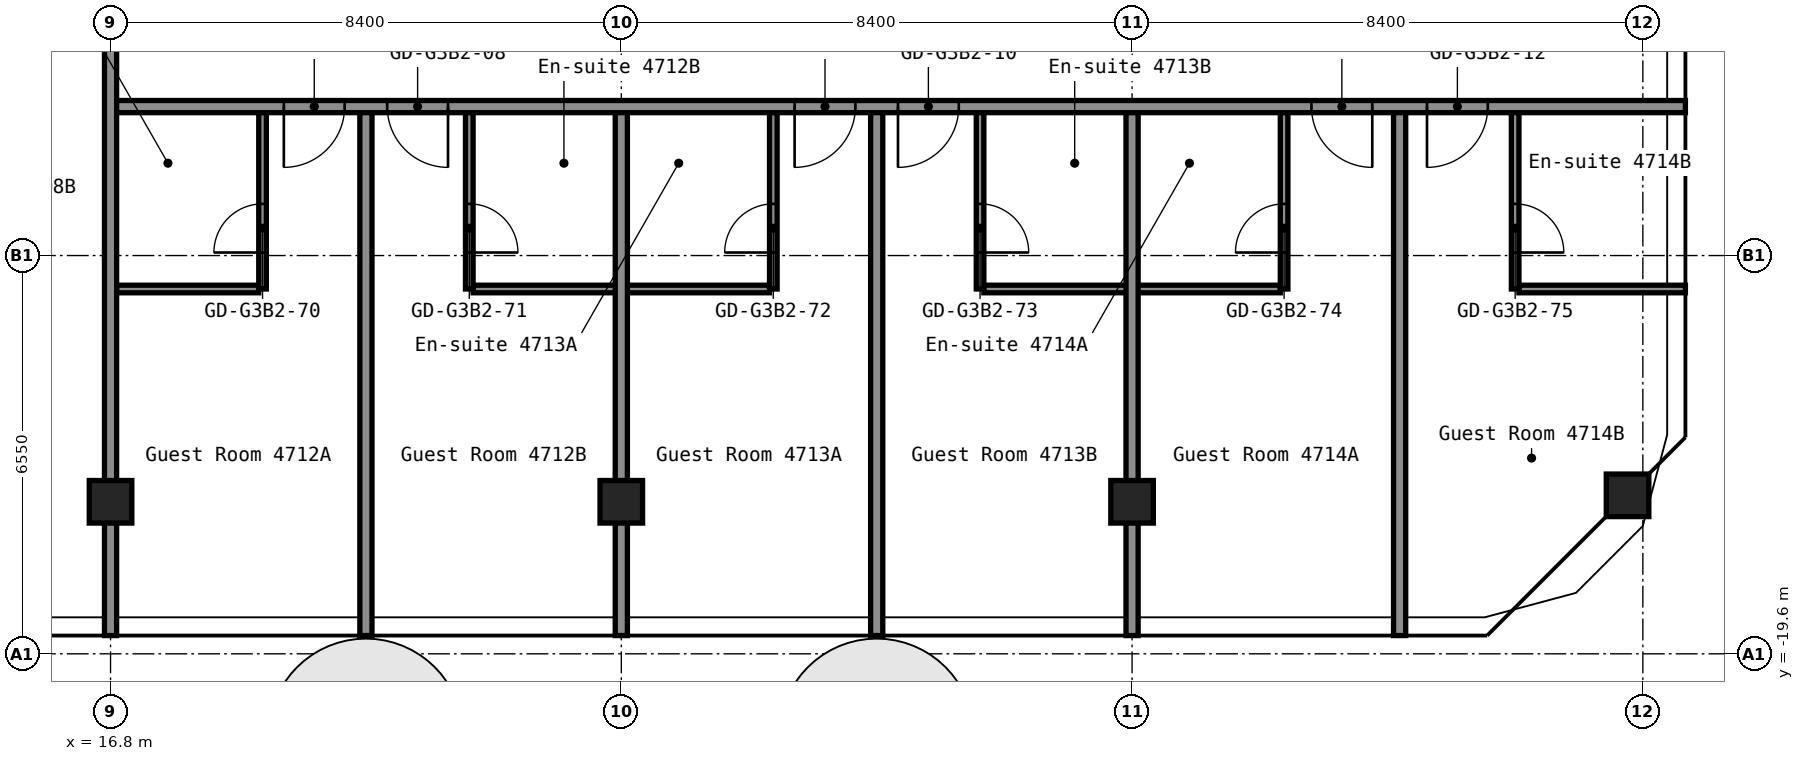
"""IFC4 building model, lengths in metres.
Left out: names, types, materials, properties, quantities, classifications, styles, units other than length and angle.
Written with IfcOpenShell. Run it as: python <this file> out.ifc"""

import sys

from ifc_helpers import new_model, si_unit, direction, frame, frame_2d, origin, origin_2d, place, context, subcontext, project, spatial, rectangle, hollow_rectangle, extrude, element, fill, save


model = new_model("IFC4")
c1 = context("Model", 3, precision=1e-05, world=origin(), true_north=direction((0.0, 1.0)))
c2 = subcontext(c1, "Body", "Model", "MODEL_VIEW")
j1 = project(units=[si_unit("LENGTHUNIT", "METRE"), si_unit("PLANEANGLEUNIT", "RADIAN")], contexts=[c1])
p1 = place(None, origin())
s1 = spatial("IfcSite", under=j1, at=p1, CompositionType="ELEMENT")
p2 = place(p1, origin())
s2 = spatial("IfcBuilding", under=s1, at=p2, CompositionType="ELEMENT")
p3 = place(p2, frame((0.0, 0.0, 166.2)))
s3 = spatial("IfcBuildingStorey", under=s2, at=p3, CompositionType="ELEMENT", Elevation=166.2)
for number, where, z_axis, x_axis in (
    (1, (16.8, -17.1, 0.0), (0.0, 0.0, 1.0), (1.0, 0.0, 0.0)),
    (2, (25.2, -17.1, 0.0), (0.0, 0.0, 1.0), (1.0, 0.0, 0.0)),
    (3, (33.6, -17.1, 0.0), (0.0, 0.0, 1.0), (1.0, 0.0, 0.0)),
    (4, (41.749, -16.994, 0.0), (0.0, 0.0, 1.0), (1.0, 0.0, 0.0)),
):
    element("IfcColumn", number, at=place(p3, frame(where, z_axis=z_axis, x_axis=x_axis)), inside=s3, PredefinedType="COLUMN", context=c2, shape_type="SweptSolid", body=[
        extrude(hollow_rectangle(XDim=0.7, YDim=0.7, WallThickness=0.028, at=origin_2d()), origin(), (0.0, 0.0, 1.0), 2.75),
    ])
p4 = place(p3, frame((16.9, -13.6, 0.0), z_axis=(0.0, 0.0, 1.0), x_axis=(1.0, 0.0, 0.0)))
e5 = element("IfcWall", 5, at=p4, inside=s3, PredefinedType="PARTITIONING", context=c2, shape_type="SweptSolid", body=[
    extrude(rectangle(XDim=2.338, YDim=0.125, at=frame_2d((1.169, 0.0))), origin(), (0.0, 0.0, 1.0), 2.75),
])
for number, where, z_axis, x_axis in (
    (6, (22.762, -13.6, 0.0), (0.0, 0.0, 1.0), (1.0, 0.0, 0.0)),
    (7, (31.163, -13.6, 0.0), (0.0, 0.0, 1.0), (1.0, 0.0, 0.0)),
):
    element("IfcWall", number, at=place(p3, frame(where, z_axis=z_axis, x_axis=x_axis)), inside=s3, PredefinedType="PARTITIONING", context=c2, shape_type="SweptSolid", body=[
        extrude(rectangle(XDim=4.875, YDim=0.125, at=frame_2d((2.438, 0.0))), origin(), (0.0, 0.0, 1.0), 2.75),
    ])
p5 = place(p3, frame((39.962, -13.6, 0.0), z_axis=(0.0, 0.0, 1.0), x_axis=(1.0, 0.0, 0.0)))
e8 = element("IfcWall", 8, at=p5, inside=s3, PredefinedType="PARTITIONING", context=c2, shape_type="SweptSolid", body=[
    extrude(rectangle(XDim=2.738, YDim=0.125, at=frame_2d((1.369, 0.0))), origin(), (0.0, 0.0, 1.0), 2.75),
])
p6 = place(p3, frame((16.8, -10.6, 0.0), z_axis=(0.0, 0.0, 1.0), x_axis=(1.0, 0.0, 0.0)))
e9 = element("IfcWall", 9, at=p6, inside=s3, PredefinedType="PARTITIONING", context=c2, shape_type="SweptSolid", body=[
    extrude(rectangle(XDim=25.9, YDim=0.2, at=frame_2d((12.95, 0.0))), origin(), (0.0, 0.0, 1.0), 2.75),
])
p7 = place(p6, frame((2.85, 0.0, 0.0)))
e10 = element("IfcOpeningElement", 10, at=p7, cuts=e9, PredefinedType="OPENING", context=c2, shape_type="SweptSolid", body=[
    extrude(rectangle(XDim=1.0, YDim=2.1, at=frame_2d((0.5, 1.05))), frame((0.0, 0.11, 0.0), z_axis=(0.0, -1.0, 0.0), x_axis=(1.0, 0.0, 0.0)), (0.0, 0.0, 1.0), 0.22),
])
p8 = place(p6, frame((4.55, 0.0, 0.0)))
e11 = element("IfcOpeningElement", 11, at=p8, cuts=e9, PredefinedType="OPENING", context=c2, shape_type="SweptSolid", body=[
    extrude(rectangle(XDim=1.0, YDim=2.1, at=frame_2d((0.5, 1.05))), frame((0.0, 0.11, 0.0), z_axis=(0.0, -1.0, 0.0), x_axis=(1.0, 0.0, 0.0)), (0.0, 0.0, 1.0), 0.22),
])
p9 = place(p6, frame((11.25, 0.0, 0.0)))
e12 = element("IfcOpeningElement", 12, at=p9, cuts=e9, PredefinedType="OPENING", context=c2, shape_type="SweptSolid", body=[
    extrude(rectangle(XDim=1.0, YDim=2.1, at=frame_2d((0.5, 1.05))), frame((0.0, 0.11, 0.0), z_axis=(0.0, -1.0, 0.0), x_axis=(1.0, 0.0, 0.0)), (0.0, 0.0, 1.0), 0.22),
])
p10 = place(p6, frame((12.95, 0.0, 0.0)))
e13 = element("IfcOpeningElement", 13, at=p10, cuts=e9, PredefinedType="OPENING", context=c2, shape_type="SweptSolid", body=[
    extrude(rectangle(XDim=1.0, YDim=2.1, at=frame_2d((0.5, 1.05))), frame((0.0, 0.11, 0.0), z_axis=(0.0, -1.0, 0.0), x_axis=(1.0, 0.0, 0.0)), (0.0, 0.0, 1.0), 0.22),
])
p11 = place(p6, frame((19.75, 0.0, 0.0)))
e14 = element("IfcOpeningElement", 14, at=p11, cuts=e9, PredefinedType="OPENING", context=c2, shape_type="SweptSolid", body=[
    extrude(rectangle(XDim=1.0, YDim=2.1, at=frame_2d((0.5, 1.05))), frame((0.0, 0.11, 0.0), z_axis=(0.0, -1.0, 0.0), x_axis=(1.0, 0.0, 0.0)), (0.0, 0.0, 1.0), 0.22),
])
p12 = place(p6, frame((21.65, 0.0, 0.0)))
e15 = element("IfcOpeningElement", 15, at=p12, cuts=e9, PredefinedType="OPENING", context=c2, shape_type="SweptSolid", body=[
    extrude(rectangle(XDim=1.0, YDim=2.1, at=frame_2d((0.5, 1.05))), frame((0.0, 0.11, 0.0), z_axis=(0.0, -1.0, 0.0), x_axis=(1.0, 0.0, 0.0)), (0.0, 0.0, 1.0), 0.22),
])
p13 = place(p3, frame((16.8, -19.3, 0.0), z_axis=(0.0, 0.0, 1.0), x_axis=(0.0, 1.0, 0.0)))
e16 = element("IfcWall", 16, at=p13, inside=s3, PredefinedType="PARTITIONING", context=c2, shape_type="SweptSolid", body=[
    extrude(rectangle(XDim=10.91, YDim=0.2, at=frame_2d((5.455, 0.0))), origin(), (0.0, 0.0, 1.0), 2.75),
])
p14 = place(p3, frame((19.3, -13.6, 0.0), z_axis=(0.0, 0.0, 1.0), x_axis=(0.0, 1.0, 0.0)))
e17 = element("IfcWall", 17, at=p14, inside=s3, PredefinedType="PARTITIONING", context=c2, shape_type="SweptSolid", body=[
    extrude(rectangle(XDim=2.9, YDim=0.125, at=frame_2d((1.45, 0.0))), origin(), (0.0, 0.0, 1.0), 2.75),
])
p15 = place(p14, frame((0.6, 0.0, 0.0)))
e18 = element("IfcOpeningElement", 18, at=p15, cuts=e17, PredefinedType="OPENING", context=c2, shape_type="SweptSolid", body=[
    extrude(rectangle(XDim=0.8, YDim=2.1, at=frame_2d((0.4, 1.05))), frame((0.0, 0.073, 0.0), z_axis=(0.0, -1.0, 0.0), x_axis=(1.0, 0.0, 0.0)), (0.0, 0.0, 1.0), 0.145),
])
p16 = place(p3, frame((21.0, -19.3, 0.0), z_axis=(0.0, 0.0, 1.0), x_axis=(0.0, 1.0, 0.0)))
e19 = element("IfcWall", 19, at=p16, inside=s3, PredefinedType="PARTITIONING", context=c2, shape_type="SweptSolid", body=[
    extrude(rectangle(XDim=8.6, YDim=0.2, at=frame_2d((4.3, 0.0))), origin(), (0.0, 0.0, 1.0), 2.75),
])
p17 = place(p3, frame((22.7, -13.6, 0.0), z_axis=(0.0, 0.0, 1.0), x_axis=(0.0, 1.0, 0.0)))
e20 = element("IfcWall", 20, at=p17, inside=s3, PredefinedType="PARTITIONING", context=c2, shape_type="SweptSolid", body=[
    extrude(rectangle(XDim=2.9, YDim=0.125, at=frame_2d((1.45, 0.0))), origin(), (0.0, 0.0, 1.0), 2.75),
])
p18 = place(p17, frame((0.6, 0.0, 0.0)))
e21 = element("IfcOpeningElement", 21, at=p18, cuts=e20, PredefinedType="OPENING", context=c2, shape_type="SweptSolid", body=[
    extrude(rectangle(XDim=0.8, YDim=2.1, at=frame_2d((0.4, 1.05))), frame((0.0, 0.073, 0.0), z_axis=(0.0, -1.0, 0.0), x_axis=(1.0, 0.0, 0.0)), (0.0, 0.0, 1.0), 0.145),
])
p19 = place(p3, frame((25.2, -19.3, 0.0), z_axis=(0.0, 0.0, 1.0), x_axis=(0.0, 1.0, 0.0)))
e22 = element("IfcWall", 22, at=p19, inside=s3, PredefinedType="PARTITIONING", context=c2, shape_type="SweptSolid", body=[
    extrude(rectangle(XDim=8.6, YDim=0.2, at=frame_2d((4.3, 0.0))), origin(), (0.0, 0.0, 1.0), 2.75),
])
p20 = place(p3, frame((27.7, -13.6, 0.0), z_axis=(0.0, 0.0, 1.0), x_axis=(0.0, 1.0, 0.0)))
e23 = element("IfcWall", 23, at=p20, inside=s3, PredefinedType="PARTITIONING", context=c2, shape_type="SweptSolid", body=[
    extrude(rectangle(XDim=2.9, YDim=0.125, at=frame_2d((1.45, 0.0))), origin(), (0.0, 0.0, 1.0), 2.75),
])
p21 = place(p20, frame((0.6, 0.0, 0.0)))
e24 = element("IfcOpeningElement", 24, at=p21, cuts=e23, PredefinedType="OPENING", context=c2, shape_type="SweptSolid", body=[
    extrude(rectangle(XDim=0.8, YDim=2.1, at=frame_2d((0.4, 1.05))), frame((0.0, 0.073, 0.0), z_axis=(0.0, -1.0, 0.0), x_axis=(1.0, 0.0, 0.0)), (0.0, 0.0, 1.0), 0.145),
])
p22 = place(p3, frame((29.4, -19.3, 0.0), z_axis=(0.0, 0.0, 1.0), x_axis=(0.0, 1.0, 0.0)))
e25 = element("IfcWall", 25, at=p22, inside=s3, PredefinedType="PARTITIONING", context=c2, shape_type="SweptSolid", body=[
    extrude(rectangle(XDim=8.6, YDim=0.2, at=frame_2d((4.3, 0.0))), origin(), (0.0, 0.0, 1.0), 2.75),
])
p23 = place(p3, frame((31.1, -13.6, 0.0), z_axis=(0.0, 0.0, 1.0), x_axis=(0.0, 1.0, 0.0)))
e26 = element("IfcWall", 26, at=p23, inside=s3, PredefinedType="PARTITIONING", context=c2, shape_type="SweptSolid", body=[
    extrude(rectangle(XDim=2.9, YDim=0.125, at=frame_2d((1.45, 0.0))), origin(), (0.0, 0.0, 1.0), 2.75),
])
p24 = place(p23, frame((0.6, 0.0, 0.0)))
e27 = element("IfcOpeningElement", 27, at=p24, cuts=e26, PredefinedType="OPENING", context=c2, shape_type="SweptSolid", body=[
    extrude(rectangle(XDim=0.8, YDim=2.1, at=frame_2d((0.4, 1.05))), frame((0.0, 0.073, 0.0), z_axis=(0.0, -1.0, 0.0), x_axis=(1.0, 0.0, 0.0)), (0.0, 0.0, 1.0), 0.145),
])
p25 = place(p3, frame((33.6, -19.3, 0.0), z_axis=(0.0, 0.0, 1.0), x_axis=(0.0, 1.0, 0.0)))
e28 = element("IfcWall", 28, at=p25, inside=s3, PredefinedType="PARTITIONING", context=c2, shape_type="SweptSolid", body=[
    extrude(rectangle(XDim=8.6, YDim=0.2, at=frame_2d((4.3, 0.0))), origin(), (0.0, 0.0, 1.0), 2.75),
])
p26 = place(p3, frame((36.1, -13.6, 0.0), z_axis=(0.0, 0.0, 1.0), x_axis=(0.0, 1.0, 0.0)))
e29 = element("IfcWall", 29, at=p26, inside=s3, PredefinedType="PARTITIONING", context=c2, shape_type="SweptSolid", body=[
    extrude(rectangle(XDim=2.9, YDim=0.125, at=frame_2d((1.45, 0.0))), origin(), (0.0, 0.0, 1.0), 2.75),
])
p27 = place(p26, frame((0.6, 0.0, 0.0)))
e30 = element("IfcOpeningElement", 30, at=p27, cuts=e29, PredefinedType="OPENING", context=c2, shape_type="SweptSolid", body=[
    extrude(rectangle(XDim=0.8, YDim=2.1, at=frame_2d((0.4, 1.05))), frame((0.0, 0.073, 0.0), z_axis=(0.0, -1.0, 0.0), x_axis=(1.0, 0.0, 0.0)), (0.0, 0.0, 1.0), 0.145),
])
p28 = place(p3, frame((38.0, -19.3, 0.0), z_axis=(0.0, 0.0, 1.0), x_axis=(0.0, 1.0, 0.0)))
e31 = element("IfcWall", 31, at=p28, inside=s3, PredefinedType="PARTITIONING", context=c2, shape_type="SweptSolid", body=[
    extrude(rectangle(XDim=8.6, YDim=0.2, at=frame_2d((4.3, 0.0))), origin(), (0.0, 0.0, 1.0), 2.75),
])
p29 = place(p3, frame((39.9, -13.6, 0.0), z_axis=(0.0, 0.0, 1.0), x_axis=(0.0, 1.0, 0.0)))
e32 = element("IfcWall", 32, at=p29, inside=s3, PredefinedType="PARTITIONING", context=c2, shape_type="SweptSolid", body=[
    extrude(rectangle(XDim=2.9, YDim=0.125, at=frame_2d((1.45, 0.0))), origin(), (0.0, 0.0, 1.0), 2.75),
])
p30 = place(p29, frame((0.6, 0.0, 0.0)))
e33 = element("IfcOpeningElement", 33, at=p30, cuts=e32, PredefinedType="OPENING", context=c2, shape_type="SweptSolid", body=[
    extrude(rectangle(XDim=0.8, YDim=2.1, at=frame_2d((0.4, 1.05))), frame((0.0, 0.073, 0.0), z_axis=(0.0, -1.0, 0.0), x_axis=(1.0, 0.0, 0.0)), (0.0, 0.0, 1.0), 0.145),
])
p31 = place(p7, origin())
e34 = element("IfcDoor", 34, at=p31, inside=s3, OperationType="SINGLE_SWING_LEFT", PredefinedType="DOOR", context=c2, shape_type="SweptSolid", body=[
    extrude(rectangle(XDim=1.0, YDim=2.1, at=frame_2d((0.5, 1.05))), frame((0.0, 0.025, 0.0), z_axis=(0.0, -1.0, 0.0), x_axis=(1.0, 0.0, 0.0)), (0.0, 0.0, 1.0), 0.05),
])
fill(e10, e34)
p32 = place(p8, origin())
e35 = element("IfcDoor", 35, at=p32, inside=s3, OperationType="SINGLE_SWING_RIGHT", PredefinedType="DOOR", context=c2, shape_type="SweptSolid", body=[
    extrude(rectangle(XDim=1.0, YDim=2.1, at=frame_2d((0.5, 1.05))), frame((0.0, 0.025, 0.0), z_axis=(0.0, -1.0, 0.0), x_axis=(1.0, 0.0, 0.0)), (0.0, 0.0, 1.0), 0.05),
])
fill(e11, e35)
p33 = place(p9, origin())
e36 = element("IfcDoor", 36, at=p33, inside=s3, OperationType="SINGLE_SWING_LEFT", PredefinedType="DOOR", context=c2, shape_type="SweptSolid", body=[
    extrude(rectangle(XDim=1.0, YDim=2.1, at=frame_2d((0.5, 1.05))), frame((0.0, 0.025, 0.0), z_axis=(0.0, -1.0, 0.0), x_axis=(1.0, 0.0, 0.0)), (0.0, 0.0, 1.0), 0.05),
])
fill(e12, e36)
p34 = place(p10, origin())
e37 = element("IfcDoor", 37, at=p34, inside=s3, OperationType="SINGLE_SWING_LEFT", PredefinedType="DOOR", context=c2, shape_type="SweptSolid", body=[
    extrude(rectangle(XDim=1.0, YDim=2.1, at=frame_2d((0.5, 1.05))), frame((0.0, 0.025, 0.0), z_axis=(0.0, -1.0, 0.0), x_axis=(1.0, 0.0, 0.0)), (0.0, 0.0, 1.0), 0.05),
])
fill(e13, e37)
p35 = place(p11, origin())
e38 = element("IfcDoor", 38, at=p35, inside=s3, OperationType="SINGLE_SWING_RIGHT", PredefinedType="DOOR", context=c2, shape_type="SweptSolid", body=[
    extrude(rectangle(XDim=1.0, YDim=2.1, at=frame_2d((0.5, 1.05))), frame((0.0, 0.025, 0.0), z_axis=(0.0, -1.0, 0.0), x_axis=(1.0, 0.0, 0.0)), (0.0, 0.0, 1.0), 0.05),
])
fill(e14, e38)
p36 = place(p12, origin())
e39 = element("IfcDoor", 39, at=p36, inside=s3, OperationType="SINGLE_SWING_LEFT", PredefinedType="DOOR", context=c2, shape_type="SweptSolid", body=[
    extrude(rectangle(XDim=1.0, YDim=2.1, at=frame_2d((0.5, 1.05))), frame((0.0, 0.025, 0.0), z_axis=(0.0, -1.0, 0.0), x_axis=(1.0, 0.0, 0.0)), (0.0, 0.0, 1.0), 0.05),
])
fill(e15, e39)
p37 = place(p15, origin())
e40 = element("IfcDoor", 40, at=p37, inside=s3, OperationType="SINGLE_SWING_RIGHT", PredefinedType="DOOR", context=c2, shape_type="SweptSolid", body=[
    extrude(rectangle(XDim=0.8, YDim=2.1, at=frame_2d((0.4, 1.05))), frame((0.0, 0.025, 0.0), z_axis=(0.0, -1.0, 0.0), x_axis=(1.0, 0.0, 0.0)), (0.0, 0.0, 1.0), 0.05),
])
fill(e18, e40)
p38 = place(p18, origin())
e41 = element("IfcDoor", 41, at=p38, inside=s3, OperationType="SINGLE_SWING_LEFT", PredefinedType="DOOR", context=c2, shape_type="SweptSolid", body=[
    extrude(rectangle(XDim=0.8, YDim=2.1, at=frame_2d((0.4, 1.05))), frame((0.0, 0.025, 0.0), z_axis=(0.0, -1.0, 0.0), x_axis=(1.0, 0.0, 0.0)), (0.0, 0.0, 1.0), 0.05),
])
fill(e21, e41)
p39 = place(p21, origin())
e42 = element("IfcDoor", 42, at=p39, inside=s3, OperationType="SINGLE_SWING_RIGHT", PredefinedType="DOOR", context=c2, shape_type="SweptSolid", body=[
    extrude(rectangle(XDim=0.8, YDim=2.1, at=frame_2d((0.4, 1.05))), frame((0.0, 0.025, 0.0), z_axis=(0.0, -1.0, 0.0), x_axis=(1.0, 0.0, 0.0)), (0.0, 0.0, 1.0), 0.05),
])
fill(e24, e42)
p40 = place(p24, origin())
e43 = element("IfcDoor", 43, at=p40, inside=s3, OperationType="SINGLE_SWING_LEFT", PredefinedType="DOOR", context=c2, shape_type="SweptSolid", body=[
    extrude(rectangle(XDim=0.8, YDim=2.1, at=frame_2d((0.4, 1.05))), frame((0.0, 0.025, 0.0), z_axis=(0.0, -1.0, 0.0), x_axis=(1.0, 0.0, 0.0)), (0.0, 0.0, 1.0), 0.05),
])
fill(e27, e43)
p41 = place(p27, origin())
e44 = element("IfcDoor", 44, at=p41, inside=s3, OperationType="SINGLE_SWING_RIGHT", PredefinedType="DOOR", context=c2, shape_type="SweptSolid", body=[
    extrude(rectangle(XDim=0.8, YDim=2.1, at=frame_2d((0.4, 1.05))), frame((0.0, 0.025, 0.0), z_axis=(0.0, -1.0, 0.0), x_axis=(1.0, 0.0, 0.0)), (0.0, 0.0, 1.0), 0.05),
])
fill(e30, e44)
p42 = place(p30, origin())
e45 = element("IfcDoor", 45, at=p42, inside=s3, OperationType="SINGLE_SWING_LEFT", PredefinedType="DOOR", context=c2, shape_type="SweptSolid", body=[
    extrude(rectangle(XDim=0.8, YDim=2.1, at=frame_2d((0.4, 1.05))), frame((0.0, 0.025, 0.0), z_axis=(0.0, -1.0, 0.0), x_axis=(1.0, 0.0, 0.0)), (0.0, 0.0, 1.0), 0.05),
])
fill(e33, e45)
save(model, sys.argv[1])
